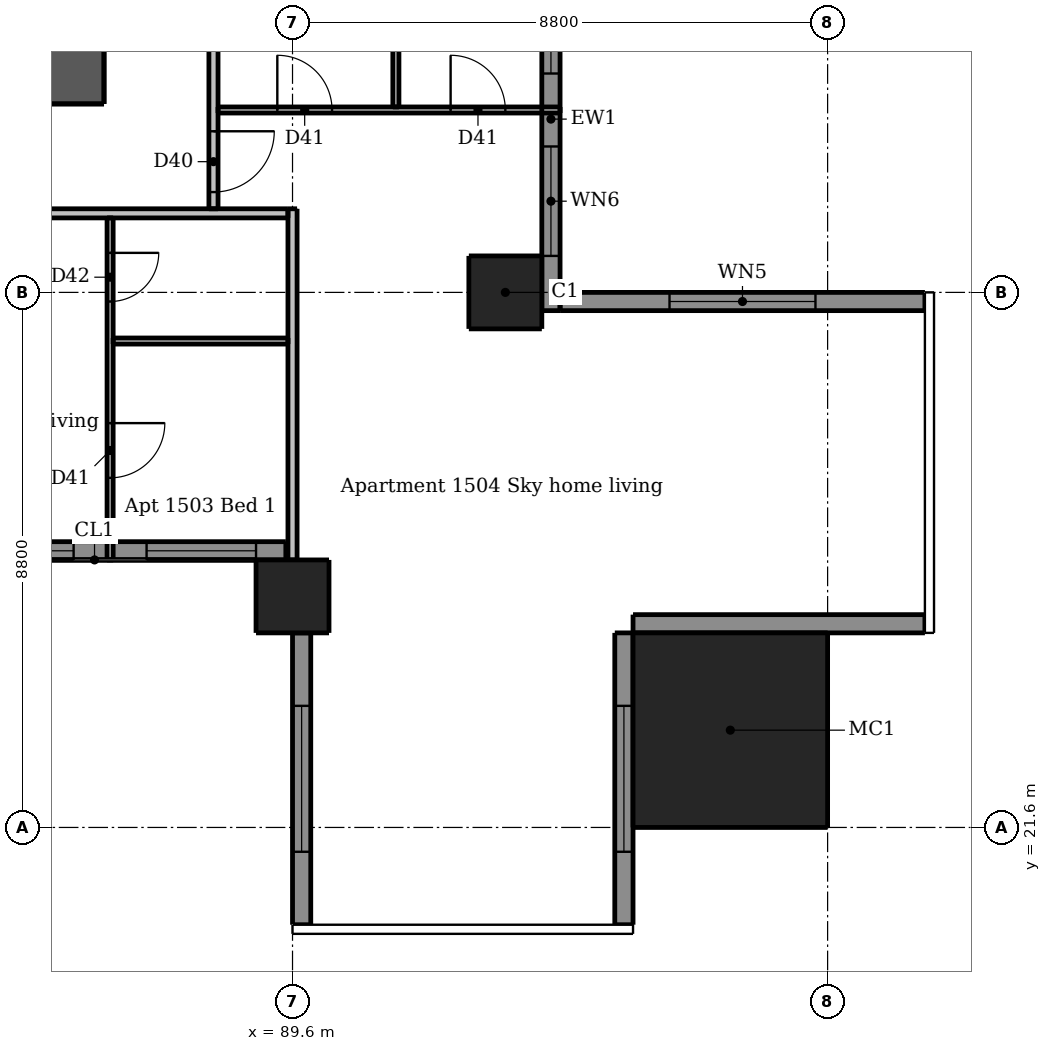
"""IFC4 building model, lengths in metres.
Left out: names, types, materials, properties, quantities, classifications, styles, units other than length and angle.
Written with IfcOpenShell. Run it as: python <this file> out.ifc"""

import sys

from ifc_helpers import new_model, si_unit, direction, frame, frame_2d, origin, origin_2d, place, context, subcontext, project, spatial, rectangle, extrude, element, fill, save


model = new_model("IFC4")
c1 = context("Model", 3, precision=1e-05, world=origin(), true_north=direction((0.0, 1.0)))
c2 = subcontext(c1, "Body", "Model", "MODEL_VIEW")
j1 = project(units=[si_unit("LENGTHUNIT", "METRE"), si_unit("PLANEANGLEUNIT", "RADIAN")], contexts=[c1])
p1 = place(None, origin())
s1 = spatial("IfcSite", under=j1, at=p1, CompositionType="ELEMENT")
p2 = place(p1, origin())
s2 = spatial("IfcBuilding", under=s1, at=p2, CompositionType="ELEMENT")
p3 = place(p2, frame((0.0, 0.0, 56.5)))
s3 = spatial("IfcBuildingStorey", under=s2, at=p3, CompositionType="ELEMENT", Elevation=56.5)
p4 = place(p3, frame((62.5, 33.95, 0.0), z_axis=(0.0, 0.0, 1.0), x_axis=(1.0, 0.0, 0.0)))
e1 = element("IfcWall", 1, at=p4, inside=s3, PredefinedType="SHEAR", context=c2, shape_type="SweptSolid", body=[
    extrude(rectangle(XDim=24.0, YDim=0.9, at=frame_2d((12.0, 0.0))), origin(), (0.0, 0.0, 1.0), 3.05),
])
p5 = place(p4, frame((2.05, 0.0, 0.0)))
e2 = element("IfcOpeningElement", 2, at=p5, cuts=e1, PredefinedType="OPENING", context=c2, shape_type="SweptSolid", body=[
    extrude(rectangle(XDim=1.1, YDim=2.1, at=frame_2d((0.55, 1.05))), frame((0.0, 0.46, 0.0), z_axis=(0.0, -1.0, 0.0), x_axis=(1.0, 0.0, 0.0)), (0.0, 0.0, 1.0), 0.92),
])
p6 = place(p4, frame((20.85, 0.0, 0.0)))
e3 = element("IfcOpeningElement", 3, at=p6, cuts=e1, PredefinedType="OPENING", context=c2, shape_type="SweptSolid", body=[
    extrude(rectangle(XDim=1.1, YDim=2.1, at=frame_2d((0.55, 1.05))), frame((0.0, 0.46, 0.0), z_axis=(0.0, -1.0, 0.0), x_axis=(1.0, 0.0, 0.0)), (0.0, 0.0, 1.0), 0.92),
])
p7 = place(p4, frame((8.0, 0.0, 0.0)))
e4 = element("IfcOpeningElement", 4, at=p7, cuts=e1, PredefinedType="OPENING", context=c2, shape_type="SweptSolid", body=[
    extrude(rectangle(XDim=1.1, YDim=2.1, at=frame_2d((0.55, 1.05))), frame((0.0, 0.46, 0.0), z_axis=(0.0, -1.0, 0.0), x_axis=(1.0, 0.0, 0.0)), (0.0, 0.0, 1.0), 0.92),
])
p8 = place(p4, frame((13.525, 0.0, 0.0)))
e5 = element("IfcOpeningElement", 5, at=p8, cuts=e1, PredefinedType="OPENING", context=c2, shape_type="SweptSolid", body=[
    extrude(rectangle(XDim=0.9, YDim=2.1, at=frame_2d((0.45, 1.05))), frame((0.0, 0.46, 0.0), z_axis=(0.0, -1.0, 0.0), x_axis=(1.0, 0.0, 0.0)), (0.0, 0.0, 1.0), 0.92),
])
p9 = place(p4, frame((17.075, 0.0, 0.0)))
e6 = element("IfcOpeningElement", 6, at=p9, cuts=e1, PredefinedType="OPENING", context=c2, shape_type="SweptSolid", body=[
    extrude(rectangle(XDim=0.9, YDim=2.1, at=frame_2d((0.45, 1.05))), frame((0.0, 0.46, 0.0), z_axis=(0.0, -1.0, 0.0), x_axis=(1.0, 0.0, 0.0)), (0.0, 0.0, 1.0), 0.92),
])
p10 = place(p3, frame((86.05, 33.5, 0.0), z_axis=(0.0, 0.0, 1.0), x_axis=(0.0, 1.0, 0.0)))
e7 = element("IfcWall", 7, at=p10, inside=s3, PredefinedType="SHEAR", context=c2, shape_type="SweptSolid", body=[
    extrude(rectangle(XDim=24.0, YDim=0.9, at=frame_2d((12.0, 0.0))), origin(), (0.0, 0.0, 1.0), 3.05),
])
p11 = place(p10, frame((11.2, 0.0, 0.0)))
e8 = element("IfcOpeningElement", 8, at=p11, cuts=e7, PredefinedType="OPENING", context=c2, shape_type="SweptSolid", body=[
    extrude(rectangle(XDim=1.6, YDim=2.1, at=frame_2d((0.8, 1.05))), frame((0.0, 0.46, 0.0), z_axis=(0.0, -1.0, 0.0), x_axis=(1.0, 0.0, 0.0)), (0.0, 0.0, 1.0), 0.92),
])
for number, where, z_axis, x_axis in (
    (9, (89.6, 25.4, 0.0), (0.0, 0.0, 1.0), (1.0, 0.0, 0.0)),
    (10, (93.1, 30.4, 0.0), (0.0, 0.0, 1.0), (1.0, 0.0, 0.0)),
):
    element("IfcColumn", number, at=place(p3, frame(where, z_axis=z_axis, x_axis=x_axis)), inside=s3, PredefinedType="COLUMN", context=c2, shape_type="SweptSolid", body=[
        extrude(rectangle(XDim=1.2, YDim=1.2, at=origin_2d()), origin(), (0.0, 0.0, 1.0), 3.05),
    ])
p12 = place(p3, frame((96.8, 23.2, 0.0), z_axis=(0.0, 0.0, 1.0), x_axis=(1.0, 0.0, 0.0)))
e11 = element("IfcColumn", 11, at=p12, inside=s3, PredefinedType="COLUMN", context=c2, shape_type="SweptSolid", body=[
    extrude(rectangle(XDim=3.2, YDim=3.2, at=origin_2d()), origin(), (0.0, 0.0, 1.0), 3.3),
])
p13 = place(p3, frame((89.75, 24.8, 0.0), z_axis=(0.0, 0.0, 1.0), x_axis=(0.0, -1.0, 0.0)))
e12 = element("IfcWall", 12, at=p13, inside=s3, PredefinedType="SOLIDWALL", context=c2, shape_type="SweptSolid", body=[
    extrude(rectangle(XDim=4.8, YDim=0.3, at=frame_2d((2.4, 0.0))), origin(), (0.0, 0.0, 1.0), 3.05),
])
p14 = place(p13, frame((1.2, 0.0, 0.15)))
e13 = element("IfcOpeningElement", 13, at=p14, cuts=e12, PredefinedType="OPENING", context=c2, shape_type="SweptSolid", body=[
    extrude(rectangle(XDim=2.4, YDim=2.1, at=frame_2d((1.2, 1.05))), frame((0.0, 0.16, 0.0), z_axis=(0.0, -1.0, 0.0), x_axis=(1.0, 0.0, 0.0)), (0.0, 0.0, 1.0), 0.32),
])
p15 = place(p3, frame((95.05, 20.0, 0.0), z_axis=(0.0, 0.0, 1.0), x_axis=(0.0, 1.0, 0.0)))
e14 = element("IfcWall", 14, at=p15, inside=s3, PredefinedType="SOLIDWALL", context=c2, shape_type="SweptSolid", body=[
    extrude(rectangle(XDim=4.8, YDim=0.3, at=frame_2d((2.4, 0.0))), origin(), (0.0, 0.0, 1.0), 3.05),
])
p16 = place(p15, frame((1.2, 0.0, 0.15)))
e15 = element("IfcOpeningElement", 15, at=p16, cuts=e14, PredefinedType="OPENING", context=c2, shape_type="SweptSolid", body=[
    extrude(rectangle(XDim=2.4, YDim=2.1, at=frame_2d((1.2, 1.05))), frame((0.0, 0.16, 0.0), z_axis=(0.0, -1.0, 0.0), x_axis=(1.0, 0.0, 0.0)), (0.0, 0.0, 1.0), 0.32),
])
p17 = place(p3, frame((95.2, 24.95, 0.0), z_axis=(0.0, 0.0, 1.0), x_axis=(1.0, 0.0, 0.0)))
e16 = element("IfcWall", 16, at=p17, inside=s3, PredefinedType="SOLIDWALL", context=c2, shape_type="SweptSolid", body=[
    extrude(rectangle(XDim=4.8, YDim=0.3, at=frame_2d((2.4, 0.0))), origin(), (0.0, 0.0, 1.0), 3.05),
])
p18 = place(p3, frame((100.0, 30.25, 0.0), z_axis=(0.0, 0.0, 1.0), x_axis=(-1.0, 0.0, 0.0)))
e17 = element("IfcWall", 17, at=p18, inside=s3, PredefinedType="SOLIDWALL", context=c2, shape_type="SweptSolid", body=[
    extrude(rectangle(XDim=6.0, YDim=0.3, at=frame_2d((3.0, 0.0))), origin(), (0.0, 0.0, 1.0), 3.05),
])
p19 = place(p18, frame((1.8, 0.0, 0.15)))
e18 = element("IfcOpeningElement", 18, at=p19, cuts=e17, PredefinedType="OPENING", context=c2, shape_type="SweptSolid", body=[
    extrude(rectangle(XDim=2.4, YDim=2.1, at=frame_2d((1.2, 1.05))), frame((0.0, 0.16, 0.0), z_axis=(0.0, -1.0, 0.0), x_axis=(1.0, 0.0, 0.0)), (0.0, 0.0, 1.0), 0.32),
])
p20 = place(p3, frame((83.69, 26.15, 0.0), z_axis=(0.0, 0.0, 1.0), x_axis=(1.0, 0.0, 0.0)))
e19 = element("IfcWall", 19, at=p20, inside=s3, PredefinedType="SOLIDWALL", context=c2, shape_type="SweptSolid", body=[
    extrude(rectangle(XDim=5.8, YDim=0.3, at=frame_2d((2.9, 0.0))), origin(), (0.0, 0.0, 1.0), 3.05),
])
p21 = place(p20, frame((0.51, 0.0, 0.15)))
e20 = element("IfcOpeningElement", 20, at=p21, cuts=e19, PredefinedType="OPENING", context=c2, shape_type="SweptSolid", body=[
    extrude(rectangle(XDim=1.8, YDim=2.1, at=frame_2d((0.9, 1.05))), frame((0.0, 0.16, 0.0), z_axis=(0.0, -1.0, 0.0), x_axis=(1.0, 0.0, 0.0)), (0.0, 0.0, 1.0), 0.32),
])
p22 = place(p20, frame((3.51, 0.0, 0.15)))
e21 = element("IfcOpeningElement", 21, at=p22, cuts=e19, PredefinedType="OPENING", context=c2, shape_type="SweptSolid", body=[
    extrude(rectangle(XDim=1.8, YDim=2.1, at=frame_2d((0.9, 1.05))), frame((0.0, 0.16, 0.0), z_axis=(0.0, -1.0, 0.0), x_axis=(1.0, 0.0, 0.0)), (0.0, 0.0, 1.0), 0.32),
])
p23 = place(p3, frame((93.85, 30.1, 0.0), z_axis=(0.0, 0.0, 1.0), x_axis=(0.0, 1.0, 0.0)))
e22 = element("IfcWall", 22, at=p23, inside=s3, PredefinedType="SOLIDWALL", context=c2, shape_type="SweptSolid", body=[
    extrude(rectangle(XDim=6.3, YDim=0.3, at=frame_2d((3.15, 0.0))), origin(), (0.0, 0.0, 1.0), 3.05),
])
p24 = place(p23, frame((0.9, 0.0, 0.15)))
e23 = element("IfcOpeningElement", 23, at=p24, cuts=e22, PredefinedType="OPENING", context=c2, shape_type="SweptSolid", body=[
    extrude(rectangle(XDim=1.8, YDim=2.1, at=frame_2d((0.9, 1.05))), frame((0.0, 0.16, 0.0), z_axis=(0.0, -1.0, 0.0), x_axis=(1.0, 0.0, 0.0)), (0.0, 0.0, 1.0), 0.32),
])
p25 = place(p23, frame((3.9, 0.0, 0.15)))
e24 = element("IfcOpeningElement", 24, at=p25, cuts=e22, PredefinedType="OPENING", context=c2, shape_type="SweptSolid", body=[
    extrude(rectangle(XDim=1.8, YDim=2.1, at=frame_2d((0.9, 1.05))), frame((0.0, 0.16, 0.0), z_axis=(0.0, -1.0, 0.0), x_axis=(1.0, 0.0, 0.0)), (0.0, 0.0, 1.0), 0.32),
])
p26 = place(p3, frame((86.6, 31.625, 0.0), z_axis=(0.0, 0.0, 1.0), x_axis=(0.0, -1.0, 0.0)))
e25 = element("IfcWall", 25, at=p26, inside=s3, PredefinedType="PARTITIONING", context=c2, shape_type="SweptSolid", body=[
    extrude(rectangle(XDim=5.625, YDim=0.1, at=frame_2d((2.812, 0.0))), origin(), (0.0, 0.0, 1.0), 3.05),
])
p27 = place(p26, frame((3.375, 0.0, 0.0)))
e26 = element("IfcOpeningElement", 26, at=p27, cuts=e25, PredefinedType="OPENING", context=c2, shape_type="SweptSolid", body=[
    extrude(rectangle(XDim=0.9, YDim=2.1, at=frame_2d((0.45, 1.05))), frame((0.0, 0.06, 0.0), z_axis=(0.0, -1.0, 0.0), x_axis=(1.0, 0.0, 0.0)), (0.0, 0.0, 1.0), 0.12),
])
p28 = place(p26, frame((0.575, 0.0, 0.0)))
e27 = element("IfcOpeningElement", 27, at=p28, cuts=e25, PredefinedType="OPENING", context=c2, shape_type="SweptSolid", body=[
    extrude(rectangle(XDim=0.8, YDim=2.1, at=frame_2d((0.4, 1.05))), frame((0.0, 0.06, 0.0), z_axis=(0.0, -1.0, 0.0), x_axis=(1.0, 0.0, 0.0)), (0.0, 0.0, 1.0), 0.12),
])
p29 = place(p3, frame((91.3, 33.45, 0.0), z_axis=(0.0, 0.0, 1.0), x_axis=(0.0, 1.0, 0.0)))
e28 = element("IfcWall", 28, at=p29, inside=s3, PredefinedType="PARTITIONING", context=c2, shape_type="SweptSolid", body=[
    extrude(rectangle(XDim=5.875, YDim=0.1, at=frame_2d((2.938, 0.0))), origin(), (0.0, 0.0, 1.0), 3.05),
])
p30 = place(p29, frame((3.75, 0.0, 0.0)))
e29 = element("IfcOpeningElement", 29, at=p30, cuts=e28, PredefinedType="OPENING", context=c2, shape_type="SweptSolid", body=[
    extrude(rectangle(XDim=0.8, YDim=2.1, at=frame_2d((0.4, 1.05))), frame((0.0, 0.06, 0.0), z_axis=(0.0, -1.0, 0.0), x_axis=(1.0, 0.0, 0.0)), (0.0, 0.0, 1.0), 0.12),
])
p31 = place(p3, frame((88.375, 33.4, 0.0), z_axis=(0.0, 0.0, 1.0), x_axis=(1.0, 0.0, 0.0)))
e30 = element("IfcWall", 30, at=p31, inside=s3, PredefinedType="PARTITIONING", context=c2, shape_type="SweptSolid", body=[
    extrude(rectangle(XDim=5.625, YDim=0.1, at=frame_2d((2.812, 0.0))), origin(), (0.0, 0.0, 1.0), 3.05),
])
p32 = place(p31, frame((0.975, 0.0, 0.0)))
e31 = element("IfcOpeningElement", 31, at=p32, cuts=e30, PredefinedType="OPENING", context=c2, shape_type="SweptSolid", body=[
    extrude(rectangle(XDim=0.9, YDim=2.1, at=frame_2d((0.45, 1.05))), frame((0.0, 0.06, 0.0), z_axis=(0.0, -1.0, 0.0), x_axis=(1.0, 0.0, 0.0)), (0.0, 0.0, 1.0), 0.12),
])
p33 = place(p31, frame((3.825, 0.0, 0.0)))
e32 = element("IfcOpeningElement", 32, at=p33, cuts=e30, PredefinedType="OPENING", context=c2, shape_type="SweptSolid", body=[
    extrude(rectangle(XDim=0.9, YDim=2.1, at=frame_2d((0.45, 1.05))), frame((0.0, 0.06, 0.0), z_axis=(0.0, -1.0, 0.0), x_axis=(1.0, 0.0, 0.0)), (0.0, 0.0, 1.0), 0.12),
])
p34 = place(p3, frame((86.65, 29.6, 0.0), z_axis=(0.0, 0.0, 1.0), x_axis=(1.0, 0.0, 0.0)))
e33 = element("IfcWall", 33, at=p34, inside=s3, PredefinedType="PARTITIONING", context=c2, shape_type="SweptSolid", body=[
    extrude(rectangle(XDim=2.875, YDim=0.1, at=frame_2d((1.438, 0.0))), origin(), (0.0, 0.0, 1.0), 3.05),
])
p35 = place(p3, frame((88.3, 60.475, 0.0), z_axis=(0.0, 0.0, 1.0), x_axis=(0.0, -1.0, 0.0)))
e34 = element("IfcWall", 34, at=p35, inside=s3, PredefinedType="PARTITIONING", context=c2, shape_type="SweptSolid", body=[
    extrude(rectangle(XDim=28.7, YDim=0.15, at=frame_2d((14.35, 0.0))), origin(), (0.0, 0.0, 1.0), 3.05),
])
p36 = place(p35, frame((27.425, 0.0, 0.0)))
e35 = element("IfcOpeningElement", 35, at=p36, cuts=e34, PredefinedType="OPENING", context=c2, shape_type="SweptSolid", body=[
    extrude(rectangle(XDim=1.0, YDim=2.1, at=frame_2d((0.5, 1.05))), frame((0.0, 0.085, 0.0), z_axis=(0.0, -1.0, 0.0), x_axis=(1.0, 0.0, 0.0)), (0.0, 0.0, 1.0), 0.17),
])
p37 = place(p35, frame((11.575, 0.0, 0.0)))
e36 = element("IfcOpeningElement", 36, at=p37, cuts=e34, PredefinedType="OPENING", context=c2, shape_type="SweptSolid", body=[
    extrude(rectangle(XDim=1.0, YDim=2.1, at=frame_2d((0.5, 1.05))), frame((0.0, 0.085, 0.0), z_axis=(0.0, -1.0, 0.0), x_axis=(1.0, 0.0, 0.0)), (0.0, 0.0, 1.0), 0.17),
])
p38 = place(p35, frame((2.575, 0.0, 0.0)))
e37 = element("IfcOpeningElement", 37, at=p38, cuts=e34, PredefinedType="OPENING", context=c2, shape_type="SweptSolid", body=[
    extrude(rectangle(XDim=1.0, YDim=2.1, at=frame_2d((0.5, 1.05))), frame((0.0, 0.085, 0.0), z_axis=(0.0, -1.0, 0.0), x_axis=(1.0, 0.0, 0.0)), (0.0, 0.0, 1.0), 0.17),
])
p39 = place(p3, frame((89.6, 26.0, 0.0), z_axis=(0.0, 0.0, 1.0), x_axis=(0.0, 1.0, 0.0)))
e38 = element("IfcWall", 38, at=p39, inside=s3, PredefinedType="PARTITIONING", context=c2, shape_type="SweptSolid", body=[
    extrude(rectangle(XDim=5.775, YDim=0.15, at=frame_2d((2.887, 0.0))), origin(), (0.0, 0.0, 1.0), 2.516),
])
p40 = place(p3, frame((89.525, 31.7, 0.0), z_axis=(0.0, 0.0, 1.0), x_axis=(-1.0, 0.0, 0.0)))
e39 = element("IfcWall", 39, at=p40, inside=s3, PredefinedType="PARTITIONING", context=c2, shape_type="SweptSolid", body=[
    extrude(rectangle(XDim=28.75, YDim=0.15, at=frame_2d((14.375, 0.0))), origin(), (0.0, 0.0, 1.0), 3.05),
])
p41 = place(p40, frame((27.375, 0.0, 0.0)))
e40 = element("IfcOpeningElement", 40, at=p41, cuts=e39, PredefinedType="OPENING", context=c2, shape_type="SweptSolid", body=[
    extrude(rectangle(XDim=1.0, YDim=2.1, at=frame_2d((0.5, 1.05))), frame((0.0, 0.085, 0.0), z_axis=(0.0, -1.0, 0.0), x_axis=(1.0, 0.0, 0.0)), (0.0, 0.0, 1.0), 0.17),
])
p42 = place(p40, frame((12.625, 0.0, 0.0)))
e41 = element("IfcOpeningElement", 41, at=p42, cuts=e39, PredefinedType="OPENING", context=c2, shape_type="SweptSolid", body=[
    extrude(rectangle(XDim=1.0, YDim=2.1, at=frame_2d((0.5, 1.05))), frame((0.0, 0.085, 0.0), z_axis=(0.0, -1.0, 0.0), x_axis=(1.0, 0.0, 0.0)), (0.0, 0.0, 1.0), 0.17),
])
p43 = place(p40, frame((4.225, 0.0, 0.0)))
e42 = element("IfcOpeningElement", 42, at=p43, cuts=e39, PredefinedType="OPENING", context=c2, shape_type="SweptSolid", body=[
    extrude(rectangle(XDim=1.0, YDim=2.1, at=frame_2d((0.5, 1.05))), frame((0.0, 0.085, 0.0), z_axis=(0.0, -1.0, 0.0), x_axis=(1.0, 0.0, 0.0)), (0.0, 0.0, 1.0), 0.17),
])
p44 = place(p14, origin())
e43 = element("IfcWindow", 43, at=p44, inside=s3, PartitioningType="DOUBLE_PANEL_VERTICAL", PredefinedType="WINDOW", context=c2, shape_type="SweptSolid", body=[
    extrude(rectangle(XDim=2.4, YDim=2.1, at=frame_2d((1.2, 1.05))), frame((0.0, 0.03, 0.0), z_axis=(0.0, -1.0, 0.0), x_axis=(1.0, 0.0, 0.0)), (0.0, 0.0, 1.0), 0.06),
])
fill(e13, e43)
p45 = place(p16, origin())
e44 = element("IfcWindow", 44, at=p45, inside=s3, PartitioningType="DOUBLE_PANEL_VERTICAL", PredefinedType="WINDOW", context=c2, shape_type="SweptSolid", body=[
    extrude(rectangle(XDim=2.4, YDim=2.1, at=frame_2d((1.2, 1.05))), frame((0.0, 0.03, 0.0), z_axis=(0.0, -1.0, 0.0), x_axis=(1.0, 0.0, 0.0)), (0.0, 0.0, 1.0), 0.06),
])
fill(e15, e44)
p46 = place(p19, origin())
e45 = element("IfcWindow", 45, at=p46, inside=s3, PartitioningType="DOUBLE_PANEL_VERTICAL", PredefinedType="WINDOW", context=c2, shape_type="SweptSolid", body=[
    extrude(rectangle(XDim=2.4, YDim=2.1, at=frame_2d((1.2, 1.05))), frame((0.0, 0.03, 0.0), z_axis=(0.0, -1.0, 0.0), x_axis=(1.0, 0.0, 0.0)), (0.0, 0.0, 1.0), 0.06),
])
fill(e18, e45)
p47 = place(p21, origin())
e46 = element("IfcWindow", 46, at=p47, inside=s3, PartitioningType="DOUBLE_PANEL_VERTICAL", PredefinedType="WINDOW", context=c2, shape_type="SweptSolid", body=[
    extrude(rectangle(XDim=1.8, YDim=2.1, at=frame_2d((0.9, 1.05))), frame((0.0, 0.03, 0.0), z_axis=(0.0, -1.0, 0.0), x_axis=(1.0, 0.0, 0.0)), (0.0, 0.0, 1.0), 0.06),
])
fill(e20, e46)
p48 = place(p22, origin())
e47 = element("IfcWindow", 47, at=p48, inside=s3, PartitioningType="DOUBLE_PANEL_VERTICAL", PredefinedType="WINDOW", context=c2, shape_type="SweptSolid", body=[
    extrude(rectangle(XDim=1.8, YDim=2.1, at=frame_2d((0.9, 1.05))), frame((0.0, 0.03, 0.0), z_axis=(0.0, -1.0, 0.0), x_axis=(1.0, 0.0, 0.0)), (0.0, 0.0, 1.0), 0.06),
])
fill(e21, e47)
p49 = place(p24, origin())
e48 = element("IfcWindow", 48, at=p49, inside=s3, PartitioningType="DOUBLE_PANEL_VERTICAL", PredefinedType="WINDOW", context=c2, shape_type="SweptSolid", body=[
    extrude(rectangle(XDim=1.8, YDim=2.1, at=frame_2d((0.9, 1.05))), frame((0.0, 0.03, 0.0), z_axis=(0.0, -1.0, 0.0), x_axis=(1.0, 0.0, 0.0)), (0.0, 0.0, 1.0), 0.06),
])
fill(e23, e48)
p50 = place(p25, origin())
e49 = element("IfcWindow", 49, at=p50, inside=s3, PartitioningType="DOUBLE_PANEL_VERTICAL", PredefinedType="WINDOW", context=c2, shape_type="SweptSolid", body=[
    extrude(rectangle(XDim=1.8, YDim=2.1, at=frame_2d((0.9, 1.05))), frame((0.0, 0.03, 0.0), z_axis=(0.0, -1.0, 0.0), x_axis=(1.0, 0.0, 0.0)), (0.0, 0.0, 1.0), 0.06),
])
fill(e24, e49)
p51 = place(p27, origin())
e50 = element("IfcDoor", 50, at=p51, inside=s3, OperationType="SINGLE_SWING_LEFT", PredefinedType="DOOR", context=c2, shape_type="SweptSolid", body=[
    extrude(rectangle(XDim=0.9, YDim=2.1, at=frame_2d((0.45, 1.05))), frame((0.0, 0.025, 0.0), z_axis=(0.0, -1.0, 0.0), x_axis=(1.0, 0.0, 0.0)), (0.0, 0.0, 1.0), 0.05),
])
fill(e26, e50)
p52 = place(p28, origin())
e51 = element("IfcDoor", 51, at=p52, inside=s3, OperationType="SINGLE_SWING_LEFT", PredefinedType="DOOR", context=c2, shape_type="SweptSolid", body=[
    extrude(rectangle(XDim=0.8, YDim=2.1, at=frame_2d((0.4, 1.05))), frame((0.0, 0.025, 0.0), z_axis=(0.0, -1.0, 0.0), x_axis=(1.0, 0.0, 0.0)), (0.0, 0.0, 1.0), 0.05),
])
fill(e27, e51)
p53 = place(p36, origin())
e52 = element("IfcDoor", 52, at=p53, inside=s3, OperationType="SINGLE_SWING_LEFT", PredefinedType="DOOR", context=c2, shape_type="SweptSolid", body=[
    extrude(rectangle(XDim=1.0, YDim=2.1, at=frame_2d((0.5, 1.05))), frame((0.0, 0.025, 0.0), z_axis=(0.0, -1.0, 0.0), x_axis=(1.0, 0.0, 0.0)), (0.0, 0.0, 1.0), 0.05),
])
fill(e35, e52)
p54 = place(p32, origin())
e53 = element("IfcDoor", 53, at=p54, inside=s3, OperationType="SINGLE_SWING_LEFT", PredefinedType="DOOR", context=c2, shape_type="SweptSolid", body=[
    extrude(rectangle(XDim=0.9, YDim=2.1, at=frame_2d((0.45, 1.05))), frame((0.0, 0.025, 0.0), z_axis=(0.0, -1.0, 0.0), x_axis=(1.0, 0.0, 0.0)), (0.0, 0.0, 1.0), 0.05),
])
fill(e31, e53)
p55 = place(p33, origin())
e54 = element("IfcDoor", 54, at=p55, inside=s3, OperationType="SINGLE_SWING_LEFT", PredefinedType="DOOR", context=c2, shape_type="SweptSolid", body=[
    extrude(rectangle(XDim=0.9, YDim=2.1, at=frame_2d((0.45, 1.05))), frame((0.0, 0.025, 0.0), z_axis=(0.0, -1.0, 0.0), x_axis=(1.0, 0.0, 0.0)), (0.0, 0.0, 1.0), 0.05),
])
fill(e32, e54)
save(model, sys.argv[1])
